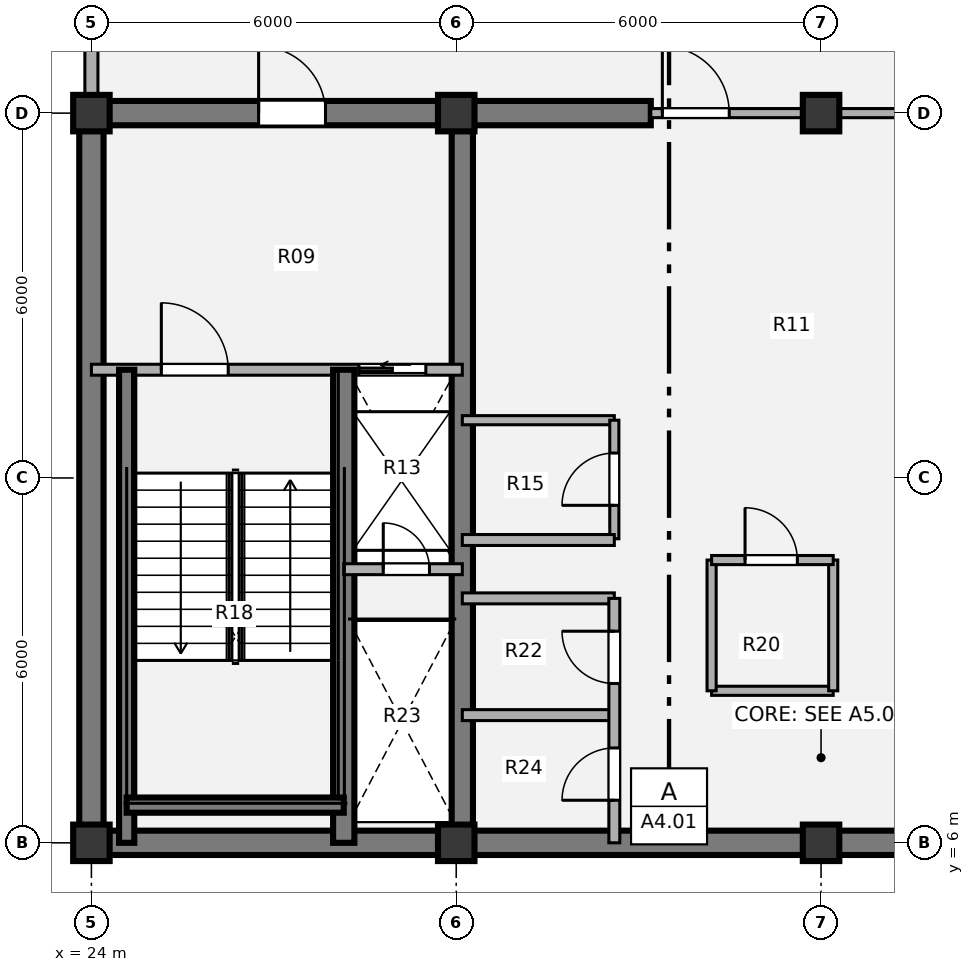
"""IFC4 building model, lengths in metres.
Left out: names, types, materials, properties, quantities, classifications, styles, units other than length and angle.
Written with IfcOpenShell. Run it as: python <this file> out.ifc"""

import sys

from ifc_helpers import new_model, si_unit, direction, frame, frame_2d, origin, origin_2d, place, context, subcontext, project, spatial, rectangle, extrude, source, transform, mapped, element, fill, save


model = new_model("IFC4")
c1 = context("Model", 3, precision=1e-05, world=origin(), true_north=direction((0.0, 1.0)))
c2 = subcontext(c1, "Body", "Model", "MODEL_VIEW")
j1 = project(units=[si_unit("LENGTHUNIT", "METRE"), si_unit("PLANEANGLEUNIT", "RADIAN")], contexts=[c1])
p1 = place(None, origin())
s1 = spatial("IfcSite", under=j1, at=p1, CompositionType="ELEMENT")
p2 = place(p1, origin())
s2 = spatial("IfcBuilding", under=s1, at=p2, CompositionType="ELEMENT")
p3 = place(p2, frame((0.0, 0.0, 218.52)))
s3 = spatial("IfcBuildingStorey", under=s2, at=p3, CompositionType="ELEMENT", Elevation=218.52)
m1 = source(origin(), c2, "Body", "SweptSolid", [
    extrude(rectangle(XDim=0.6, YDim=0.6, at=origin_2d()), origin(), (0.0, 0.0, 1.0), 4.5),
])
for number, where, z_axis, x_axis in (
    (1, (24.0, 6.0, 0.0), (0.0, 0.0, 1.0), (1.0, 0.0, 0.0)),
    (2, (30.0, 6.0, 0.0), (0.0, 0.0, 1.0), (1.0, 0.0, 0.0)),
    (3, (36.0, 6.0, 0.0), (0.0, 0.0, 1.0), (1.0, 0.0, 0.0)),
    (4, (24.0, 18.0, 0.0), (0.0, 0.0, 1.0), (1.0, 0.0, 0.0)),
    (5, (30.0, 18.0, 0.0), (0.0, 0.0, 1.0), (1.0, 0.0, 0.0)),
    (6, (36.0, 18.0, 0.0), (0.0, 0.0, 1.0), (1.0, 0.0, 0.0)),
):
    element("IfcColumn", number, at=place(p3, frame(where, z_axis=z_axis, x_axis=x_axis)), inside=s3, PredefinedType="COLUMN", context=c2, shape_type="MappedRepresentation", body=[
        mapped(m1, transform((0.0, 0.0, 0.0), x_axis=(1.0, 0.0, 0.0), y_axis=(0.0, 1.0, 0.0), z_axis=(0.0, 0.0, 1.0), scale=1.0)),
    ])
p4 = place(p3, frame((48.2, 6.0, 0.0), z_axis=(0.0, 0.0, 1.0), x_axis=(-1.0, 0.0, 0.0)))
e7 = element("IfcWall", 7, at=p4, inside=s3, PredefinedType="SHEAR", context=c2, shape_type="SweptSolid", body=[
    extrude(rectangle(XDim=24.4, YDim=0.4, at=frame_2d((12.2, 0.0))), origin(), (0.0, 0.0, 1.0), 4.5),
])
p5 = place(p3, frame((24.0, 6.0, 0.0), z_axis=(0.0, 0.0, 1.0), x_axis=(0.0, 1.0, 0.0)))
e8 = element("IfcWall", 8, at=p5, inside=s3, PredefinedType="SHEAR", context=c2, shape_type="SweptSolid", body=[
    extrude(rectangle(XDim=12.0, YDim=0.4, at=frame_2d((6.0, 0.0))), origin(), (0.0, 0.0, 1.0), 4.5),
])
p6 = place(p3, frame((23.8, 18.0, 0.0), z_axis=(0.0, 0.0, 1.0), x_axis=(1.0, 0.0, 0.0)))
e9 = element("IfcWall", 9, at=p6, inside=s3, PredefinedType="SHEAR", context=c2, shape_type="SweptSolid", body=[
    extrude(rectangle(XDim=9.4, YDim=0.4, at=frame_2d((4.7, 0.0))), origin(), (0.0, 0.0, 1.0), 4.5),
])
p7 = place(p6, frame((2.95, 0.0, 0.0)))
e10 = element("IfcOpeningElement", 10, at=p7, cuts=e9, PredefinedType="OPENING", context=c2, shape_type="SweptSolid", body=[
    extrude(rectangle(XDim=1.1, YDim=2.1, at=origin_2d()), frame((0.55, 0.21, 1.05), z_axis=(0.0, -1.0, 0.0), x_axis=(1.0, 0.0, 0.0)), (0.0, 0.0, 1.0), 0.42),
])
p8 = place(p3, frame((30.1, 6.0, 0.0), z_axis=(0.0, 0.0, 1.0), x_axis=(0.0, 1.0, 0.0)))
e11 = element("IfcWall", 11, at=p8, inside=s3, PredefinedType="SHEAR", context=c2, shape_type="SweptSolid", body=[
    extrude(rectangle(XDim=12.0, YDim=0.35, at=frame_2d((6.0, 0.0))), origin(), (0.0, 0.0, 1.0), 4.5),
])
p9 = place(p3, frame((24.0, 18.28, 0.0), z_axis=(0.0, 0.0, 1.0), x_axis=(0.0, 1.0, 0.0)))
e12 = element("IfcWall", 12, at=p9, inside=s3, PredefinedType="SOLIDWALL", context=c2, shape_type="SweptSolid", body=[
    extrude(rectangle(XDim=2.77, YDim=0.215, at=frame_2d((1.385, 0.0))), origin(), (0.0, 0.0, 1.0), 2.28),
])
p10 = place(p3, frame((30.1, 12.95, 0.0), z_axis=(0.0, 0.0, 1.0), x_axis=(1.0, 0.0, 0.0)))
e13 = element("IfcWall", 13, at=p10, inside=s3, PredefinedType="PARTITIONING", context=c2, shape_type="SweptSolid", body=[
    extrude(rectangle(XDim=2.5, YDim=0.15, at=frame_2d((1.25, 0.0))), origin(), (0.0, 0.0, 1.0), 4.062),
])
p11 = place(p3, frame((32.6, 11.0, 0.0), z_axis=(0.0, 0.0, 1.0), x_axis=(0.0, 1.0, 0.0)))
e14 = element("IfcWall", 14, at=p11, inside=s3, PredefinedType="PARTITIONING", context=c2, shape_type="SweptSolid", body=[
    extrude(rectangle(XDim=1.95, YDim=0.15, at=frame_2d((0.975, 0.0))), origin(), (0.0, 0.0, 1.0), 4.062),
])
p12 = place(p11, frame((0.55, 0.0, 0.0)))
e15 = element("IfcOpeningElement", 15, at=p12, cuts=e14, PredefinedType="OPENING", context=c2, shape_type="SweptSolid", body=[
    extrude(rectangle(XDim=0.86, YDim=2.1, at=origin_2d()), frame((0.43, 0.085, 1.05), z_axis=(0.0, -1.0, 0.0), x_axis=(1.0, 0.0, 0.0)), (0.0, 0.0, 1.0), 0.17),
])
p13 = place(p3, frame((34.2, 8.5, 0.0), z_axis=(0.0, 0.0, 1.0), x_axis=(1.0, 0.0, 0.0)))
e16 = element("IfcWall", 16, at=p13, inside=s3, PredefinedType="PARTITIONING", context=c2, shape_type="SweptSolid", body=[
    extrude(rectangle(XDim=2.0, YDim=0.15, at=frame_2d((1.0, 0.0))), origin(), (0.0, 0.0, 1.0), 4.062),
])
p14 = place(p3, frame((34.2, 8.5, 0.0), z_axis=(0.0, 0.0, 1.0), x_axis=(0.0, 1.0, 0.0)))
e17 = element("IfcWall", 17, at=p14, inside=s3, PredefinedType="PARTITIONING", context=c2, shape_type="SweptSolid", body=[
    extrude(rectangle(XDim=2.15, YDim=0.15, at=frame_2d((1.075, 0.0))), origin(), (0.0, 0.0, 1.0), 4.062),
])
p15 = place(p3, frame((36.2, 8.5, 0.0), z_axis=(0.0, 0.0, 1.0), x_axis=(0.0, 1.0, 0.0)))
e18 = element("IfcWall", 18, at=p15, inside=s3, PredefinedType="PARTITIONING", context=c2, shape_type="SweptSolid", body=[
    extrude(rectangle(XDim=2.15, YDim=0.15, at=frame_2d((1.075, 0.0))), origin(), (0.0, 0.0, 1.0), 3.277),
])
p16 = place(p3, frame((34.2, 10.65, 0.0), z_axis=(0.0, 0.0, 1.0), x_axis=(1.0, 0.0, 0.0)))
e19 = element("IfcWall", 19, at=p16, inside=s3, PredefinedType="PARTITIONING", context=c2, shape_type="SweptSolid", body=[
    extrude(rectangle(XDim=2.0, YDim=0.15, at=frame_2d((1.0, 0.0))), origin(), (0.0, 0.0, 1.0), 4.062),
])
p17 = place(p16, frame((0.55, 0.0, 0.0)))
e20 = element("IfcOpeningElement", 20, at=p17, cuts=e19, PredefinedType="OPENING", context=c2, shape_type="SweptSolid", body=[
    extrude(rectangle(XDim=0.86, YDim=2.1, at=origin_2d()), frame((0.43, 0.085, 1.05), z_axis=(0.0, -1.0, 0.0), x_axis=(1.0, 0.0, 0.0)), (0.0, 0.0, 1.0), 0.17),
])
for number, where, z_axis, x_axis in (
    (21, (30.1, 10.98, 0.0), (0.0, 0.0, 1.0), (1.0, 0.0, 0.0)),
    (22, (30.1, 8.1, 0.0), (0.0, 0.0, 1.0), (1.0, 0.0, 0.0)),
    (23, (30.1, 10.02, 0.0), (0.0, 0.0, 1.0), (1.0, 0.0, 0.0)),
):
    element("IfcWall", number, at=place(p3, frame(where, z_axis=z_axis, x_axis=x_axis)), inside=s3, PredefinedType="PARTITIONING", context=c2, shape_type="SweptSolid", body=[
        extrude(rectangle(XDim=2.5, YDim=0.18, at=frame_2d((1.25, 0.0))), origin(), (0.0, 0.0, 1.0), 4.062),
    ])
p18 = place(p3, frame((32.6, 6.0, 0.0), z_axis=(0.0, 0.0, 1.0), x_axis=(0.0, 1.0, 0.0)))
e24 = element("IfcWall", 24, at=p18, inside=s3, PredefinedType="PARTITIONING", context=c2, shape_type="SweptSolid", body=[
    extrude(rectangle(XDim=4.02, YDim=0.18, at=frame_2d((2.01, 0.0))), origin(), (0.0, 0.0, 1.0), 4.062),
])
p19 = place(p18, frame((0.7, 0.0, 0.0)))
e25 = element("IfcOpeningElement", 25, at=p19, cuts=e24, PredefinedType="OPENING", context=c2, shape_type="SweptSolid", body=[
    extrude(rectangle(XDim=0.86, YDim=2.1, at=origin_2d()), frame((0.43, 0.1, 1.05), z_axis=(0.0, -1.0, 0.0), x_axis=(1.0, 0.0, 0.0)), (0.0, 0.0, 1.0), 0.2),
])
p20 = place(p18, frame((2.62, 0.0, 0.0)))
e26 = element("IfcOpeningElement", 26, at=p20, cuts=e24, PredefinedType="OPENING", context=c2, shape_type="SweptSolid", body=[
    extrude(rectangle(XDim=0.86, YDim=2.1, at=origin_2d()), frame((0.43, 0.1, 1.05), z_axis=(0.0, -1.0, 0.0), x_axis=(1.0, 0.0, 0.0)), (0.0, 0.0, 1.0), 0.2),
])
p21 = place(p3, frame((33.2, 18.0, 0.0), z_axis=(0.0, 0.0, 1.0), x_axis=(1.0, 0.0, 0.0)))
e27 = element("IfcWall", 27, at=p21, inside=s3, PredefinedType="PARTITIONING", context=c2, shape_type="SweptSolid", body=[
    extrude(rectangle(XDim=5.6, YDim=0.15, at=frame_2d((2.8, 0.0))), origin(), (0.0, 0.0, 1.0), 3.077),
])
p22 = place(p21, frame((0.19, 0.0, 0.0)))
e28 = element("IfcOpeningElement", 28, at=p22, cuts=e27, PredefinedType="OPENING", context=c2, shape_type="SweptSolid", body=[
    extrude(rectangle(XDim=1.1, YDim=2.1, at=origin_2d()), frame((0.55, 0.085, 1.05), z_axis=(0.0, -1.0, 0.0), x_axis=(1.0, 0.0, 0.0)), (0.0, 0.0, 1.0), 0.17),
])
p23 = place(p21, frame((4.31, 0.0, 0.0)))
e29 = element("IfcOpeningElement", 29, at=p23, cuts=e27, PredefinedType="OPENING", context=c2, shape_type="SweptSolid", body=[
    extrude(rectangle(XDim=1.1, YDim=2.1, at=origin_2d()), frame((0.55, 0.085, 1.05), z_axis=(0.0, -1.0, 0.0), x_axis=(1.0, 0.0, 0.0)), (0.0, 0.0, 1.0), 0.17),
])
p24 = place(p3, frame((24.0, 13.78, 0.0), z_axis=(0.0, 0.0, 1.0), x_axis=(1.0, 0.0, 0.0)))
e30 = element("IfcWall", 30, at=p24, inside=s3, PredefinedType="PARTITIONING", context=c2, shape_type="SweptSolid", body=[
    extrude(rectangle(XDim=6.1, YDim=0.18, at=frame_2d((3.05, 0.0))), origin(), (0.0, 0.0, 1.0), 4.062),
])
p25 = place(p24, frame((1.15, 0.0, 0.0)))
e31 = element("IfcOpeningElement", 31, at=p25, cuts=e30, PredefinedType="OPENING", context=c2, shape_type="SweptSolid", body=[
    extrude(rectangle(XDim=1.1, YDim=2.1, at=origin_2d()), frame((0.55, 0.1, 1.05), z_axis=(0.0, -1.0, 0.0), x_axis=(1.0, 0.0, 0.0)), (0.0, 0.0, 1.0), 0.2),
])
p26 = place(p24, frame((4.4, 0.0, 0.0)))
e32 = element("IfcOpeningElement", 32, at=p26, cuts=e30, PredefinedType="OPENING", context=c2, shape_type="SweptSolid", body=[
    extrude(rectangle(XDim=1.1, YDim=2.1, at=origin_2d()), frame((0.55, 0.1, 1.05), z_axis=(0.0, -1.0, 0.0), x_axis=(1.0, 0.0, 0.0)), (0.0, 0.0, 1.0), 0.2),
])
p27 = place(p3, frame((28.15, 6.0, 0.0), z_axis=(0.0, 0.0, 1.0), x_axis=(0.0, 1.0, 0.0)))
e33 = element("IfcWall", 33, at=p27, inside=s3, PredefinedType="SHEAR", context=c2, shape_type="SweptSolid", body=[
    extrude(rectangle(XDim=7.78, YDim=0.35, at=frame_2d((3.89, 0.0))), origin(), (0.0, 0.0, 1.0), 4.412),
])
p28 = place(p3, frame((24.58, 6.0, 0.0), z_axis=(0.0, 0.0, 1.0), x_axis=(0.0, 1.0, 0.0)))
e34 = element("IfcWall", 34, at=p28, inside=s3, PredefinedType="SHEAR", context=c2, shape_type="SweptSolid", body=[
    extrude(rectangle(XDim=7.78, YDim=0.25, at=frame_2d((3.89, 0.0))), origin(), (0.0, 0.0, 1.0), 4.412),
])
p29 = place(p3, frame((24.58, 6.62, 0.0), z_axis=(0.0, 0.0, 1.0), x_axis=(1.0, 0.0, 0.0)))
e35 = element("IfcWall", 35, at=p29, inside=s3, PredefinedType="SHEAR", context=c2, shape_type="SweptSolid", body=[
    extrude(rectangle(XDim=3.57, YDim=0.25, at=frame_2d((1.785, 0.0))), origin(), (0.0, 0.0, 1.0), 4.412),
])
p30 = place(p3, frame((28.15, 10.5, 0.0), z_axis=(0.0, 0.0, 1.0), x_axis=(1.0, 0.0, 0.0)))
e36 = element("IfcWall", 36, at=p30, inside=s3, PredefinedType="PARTITIONING", context=c2, shape_type="SweptSolid", body=[
    extrude(rectangle(XDim=1.95, YDim=0.18, at=frame_2d((0.975, 0.0))), origin(), (0.0, 0.0, 1.0), 4.062),
])
p31 = place(p30, frame((0.65, 0.0, 0.0)))
e37 = element("IfcOpeningElement", 37, at=p31, cuts=e36, PredefinedType="OPENING", context=c2, shape_type="SweptSolid", body=[
    extrude(rectangle(XDim=0.76, YDim=2.05, at=origin_2d()), frame((0.38, 0.1, 1.025), z_axis=(0.0, -1.0, 0.0), x_axis=(1.0, 0.0, 0.0)), (0.0, 0.0, 1.0), 0.2),
])
m2 = source(origin(), c2, "Body", "SweptSolid", [
    extrude(rectangle(XDim=0.86, YDim=2.1, at=origin_2d()), frame((0.43, 0.025, 1.05), z_axis=(0.0, -1.0, 0.0), x_axis=(1.0, 0.0, 0.0)), (0.0, 0.0, 1.0), 0.05),
])
p32 = place(p12, origin())
e38 = element("IfcDoor", 38, at=p32, inside=s3, OperationType="SINGLE_SWING_LEFT", PredefinedType="DOOR", context=c2, shape_type="MappedRepresentation", body=[
    mapped(m2, transform((0.0, 0.0, 0.0), x_axis=(1.0, 0.0, 0.0), y_axis=(0.0, 1.0, 0.0), z_axis=(0.0, 0.0, 1.0), scale=1.0)),
])
fill(e15, e38)
p33 = place(p17, origin())
e39 = element("IfcDoor", 39, at=p33, inside=s3, OperationType="SINGLE_SWING_LEFT", PredefinedType="DOOR", context=c2, shape_type="MappedRepresentation", body=[
    mapped(m2, transform((0.0, 0.0, 0.0), x_axis=(1.0, 0.0, 0.0), y_axis=(0.0, 1.0, 0.0), z_axis=(0.0, 0.0, 1.0), scale=1.0)),
])
fill(e20, e39)
p34 = place(p19, origin())
e40 = element("IfcDoor", 40, at=p34, inside=s3, OperationType="SINGLE_SWING_LEFT", PredefinedType="DOOR", context=c2, shape_type="MappedRepresentation", body=[
    mapped(m2, transform((0.0, 0.0, 0.0), x_axis=(1.0, 0.0, 0.0), y_axis=(0.0, 1.0, 0.0), z_axis=(0.0, 0.0, 1.0), scale=1.0)),
])
fill(e25, e40)
p35 = place(p20, origin())
e41 = element("IfcDoor", 41, at=p35, inside=s3, OperationType="SINGLE_SWING_RIGHT", PredefinedType="DOOR", context=c2, shape_type="MappedRepresentation", body=[
    mapped(m2, transform((0.0, 0.0, 0.0), x_axis=(1.0, 0.0, 0.0), y_axis=(0.0, 1.0, 0.0), z_axis=(0.0, 0.0, 1.0), scale=1.0)),
])
fill(e26, e41)
m3 = source(origin(), c2, "Body", "SweptSolid", [
    extrude(rectangle(XDim=1.1, YDim=2.1, at=origin_2d()), frame((0.55, 0.025, 1.05), z_axis=(0.0, -1.0, 0.0), x_axis=(1.0, 0.0, 0.0)), (0.0, 0.0, 1.0), 0.05),
])
p36 = place(p22, origin())
e42 = element("IfcDoor", 42, at=p36, inside=s3, OperationType="SINGLE_SWING_LEFT", PredefinedType="DOOR", context=c2, shape_type="MappedRepresentation", body=[
    mapped(m3, transform((0.0, 0.0, 0.0), x_axis=(1.0, 0.0, 0.0), y_axis=(0.0, 1.0, 0.0), z_axis=(0.0, 0.0, 1.0), scale=1.0)),
])
fill(e28, e42)
m4 = source(origin(), c2, "Body", "SweptSolid", [
    extrude(rectangle(XDim=1.1, YDim=2.1, at=origin_2d()), frame((0.55, 0.025, 1.05), z_axis=(0.0, -1.0, 0.0), x_axis=(1.0, 0.0, 0.0)), (0.0, 0.0, 1.0), 0.05),
])
p37 = place(p25, origin())
e43 = element("IfcDoor", 43, at=p37, inside=s3, OperationType="SINGLE_SWING_LEFT", PredefinedType="DOOR", context=c2, shape_type="MappedRepresentation", body=[
    mapped(m4, transform((0.0, 0.0, 0.0), x_axis=(1.0, 0.0, 0.0), y_axis=(0.0, 1.0, 0.0), z_axis=(0.0, 0.0, 1.0), scale=1.0)),
])
fill(e31, e43)
m5 = source(origin(), c2, "Body", "SweptSolid", [
    extrude(rectangle(XDim=1.1, YDim=2.1, at=origin_2d()), frame((0.55, 0.025, 1.05), z_axis=(0.0, -1.0, 0.0), x_axis=(1.0, 0.0, 0.0)), (0.0, 0.0, 1.0), 0.05),
])
p38 = place(p26, origin())
e44 = element("IfcDoor", 44, at=p38, inside=s3, OperationType="SLIDING_TO_LEFT", PredefinedType="DOOR", context=c2, shape_type="MappedRepresentation", body=[
    mapped(m5, transform((0.0, 0.0, 0.0), x_axis=(1.0, 0.0, 0.0), y_axis=(0.0, 1.0, 0.0), z_axis=(0.0, 0.0, 1.0), scale=1.0)),
])
fill(e32, e44)
m6 = source(origin(), c2, "Body", "SweptSolid", [
    extrude(rectangle(XDim=0.76, YDim=2.05, at=origin_2d()), frame((0.38, 0.025, 1.025), z_axis=(0.0, -1.0, 0.0), x_axis=(1.0, 0.0, 0.0)), (0.0, 0.0, 1.0), 0.05),
])
p39 = place(p31, origin())
e45 = element("IfcDoor", 45, at=p39, inside=s3, OperationType="SINGLE_SWING_LEFT", PredefinedType="DOOR", context=c2, shape_type="MappedRepresentation", body=[
    mapped(m6, transform((0.0, 0.0, 0.0), x_axis=(1.0, 0.0, 0.0), y_axis=(0.0, 1.0, 0.0), z_axis=(0.0, 0.0, 1.0), scale=1.0)),
])
fill(e37, e45)
p40 = place(p7, origin())
e46 = element("IfcDoor", 46, at=p40, inside=s3, OperationType="SINGLE_SWING_LEFT", PredefinedType="DOOR", context=c2, shape_type="MappedRepresentation", body=[
    mapped(m3, transform((0.0, 0.0, 0.0), x_axis=(1.0, 0.0, 0.0), y_axis=(0.0, 1.0, 0.0), z_axis=(0.0, 0.0, 1.0), scale=1.0)),
])
fill(e10, e46)
save(model, sys.argv[1])
